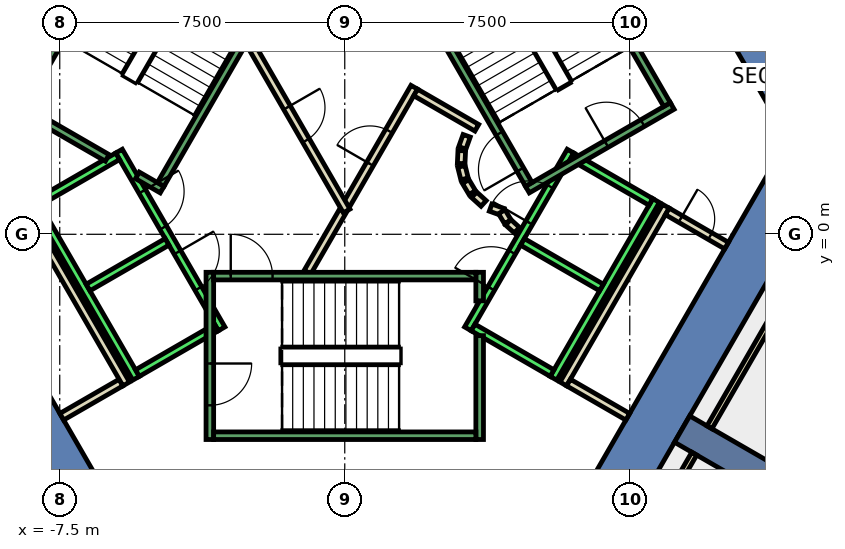
"""IFC4 building model, lengths in metres.
Left out: names, types, materials, properties, quantities, classifications, styles, units other than length and angle.
Written with IfcOpenShell. Run it as: python <this file> out.ifc"""

import sys

from ifc_helpers import new_model, si_unit, direction, frame, frame_2d, origin, place, context, subcontext, project, spatial, polyline, rectangle, outline, extrude, element, fill, save


model = new_model("IFC4")
c1 = context("Model", 3, precision=1e-05, world=origin(), true_north=direction((0.0, 1.0)))
c2 = subcontext(c1, "Body", "Model", "MODEL_VIEW")
j1 = project(units=[si_unit("LENGTHUNIT", "METRE"), si_unit("PLANEANGLEUNIT", "RADIAN")], contexts=[c1])
p1 = place(None, origin())
s1 = spatial("IfcSite", under=j1, at=p1, CompositionType="ELEMENT")
p2 = place(p1, origin())
s2 = spatial("IfcBuilding", under=s1, at=p2, CompositionType="ELEMENT")
p3 = place(p2, frame((0.0, 0.0, 227.6)))
s3 = spatial("IfcBuildingStorey", under=s2, at=p3, CompositionType="ELEMENT", Elevation=227.6)
p4 = place(p3, frame((0.0, 0.0, -0.4)))
e1 = element("IfcWall", 1, at=p4, inside=s3, PredefinedType="SHEAR", context=c2, shape_type="SweptSolid", body=[
    extrude(outline(polyline([(8.084, 11.498), (6.871, 10.798), (11.662, 2.5), (13.279, 2.5), (8.084, 11.498)])), origin(), (0.0, 0.0, 1.0), 4.2),
])
p5 = place(p3, frame((0.0, 0.0, -0.4)))
e2 = element("IfcWall", 2, at=p5, inside=s3, PredefinedType="SHEAR", context=c2, shape_type="SweptSolid", body=[
    extrude(outline(polyline([(-11.834, 5.002), (-10.622, 4.302), (-5.831, 12.6), (-6.64, 14.0), (-11.834, 5.002)])), origin(), (0.0, 0.0, 1.0), 4.2),
])
p6 = place(p3, frame((0.0, 0.0, -0.4)))
e3 = element("IfcWall", 3, at=p6, inside=s3, PredefinedType="SHEAR", context=c2, shape_type="SweptSolid", body=[
    extrude(outline(polyline([(-13.279, 2.5), (-6.64, -9.0), (-5.831, -7.6), (-11.662, 2.5), (-13.279, 2.5)])), origin(), (0.0, 0.0, 1.0), 4.2),
])
p7 = place(p3, frame((0.0, 0.0, -0.4)))
e4 = element("IfcWall", 4, at=p7, inside=s3, PredefinedType="SHEAR", context=c2, shape_type="SweptSolid", body=[
    extrude(outline(polyline([(6.64, -9.0), (13.279, 2.5), (11.662, 2.5), (5.831, -7.6), (6.64, -9.0)])), origin(), (0.0, 0.0, 1.0), 4.2),
])
p8 = place(p3, frame((8.877, -5.125, -0.4), z_axis=(0.0, 0.0, 1.0), x_axis=(0.866017533419, -0.500013631625, 0.0)))
e5 = element("IfcWall", 5, at=p8, inside=s3, PredefinedType="SHEAR", context=c2, shape_type="SweptSolid", body=[
    extrude(rectangle(XDim=9.0, YDim=0.8, at=frame_2d((4.5, 0.0))), origin(), (0.0, 0.0, 1.0), 4.2),
])
p9 = place(p3, frame((5.751, -3.938, 0.0), z_axis=(0.0, 0.0, 1.0), x_axis=(0.500034260056, 0.866005622828, 0.0)))
e6 = element("IfcWall", 6, at=p9, inside=s3, PredefinedType="PARTITIONING", context=c2, shape_type="SweptSolid", body=[
    extrude(rectangle(XDim=5.399, YDim=0.2, at=frame_2d((2.7, 0.0))), origin(), (0.0, 0.0, 1.0), 3.8),
])
p10 = place(p3, frame((8.488, 0.602, 0.0), z_axis=(0.0, 0.0, 1.0), x_axis=(0.86585331735, -0.500297944063, 0.0)))
e7 = element("IfcWall", 7, at=p10, inside=s3, PredefinedType="PARTITIONING", context=c2, shape_type="SweptSolid", body=[
    extrude(rectangle(XDim=1.799, YDim=0.2, at=frame_2d((0.9, 0.0))), origin(), (0.0, 0.0, 1.0), 3.8),
])
p11 = place(p10, frame((0.4, 0.0, 0.0)))
e8 = element("IfcOpeningElement", 8, at=p11, cuts=e7, PredefinedType="OPENING", context=c2, shape_type="SweptSolid", body=[
    extrude(rectangle(XDim=0.9, YDim=2.1, at=frame_2d((0.45, 1.05))), frame((0.0, 0.11, 0.0), z_axis=(0.0, -1.0, 0.0), x_axis=(1.0, 0.0, 0.0)), (0.0, 0.0, 1.0), 0.22),
])
for number, where, z_axis, x_axis in (
    (9, (7.447, -4.801, 0.0), (0.0, 0.0, 1.0), (-0.866, 0.499, 0.0)),
    (10, (-5.888, -3.902, 0.0), (0.0, 0.0, 1.0), (-0.866, -0.499, 0.0)),
):
    element("IfcWall", number, at=place(p3, frame(where, z_axis=z_axis, x_axis=x_axis)), inside=s3, PredefinedType="PARTITIONING", context=c2, shape_type="SweptSolid", body=[
        extrude(rectangle(XDim=1.8, YDim=0.2, at=frame_2d((0.9, 0.0))), origin(), (0.0, 0.0, 1.0), 3.8),
    ])
p12 = place(p3, frame((-9.751, 2.99, 0.0), z_axis=(0.0, 0.0, 1.0), x_axis=(0.500012163284, -0.866018381195, 0.0)))
e11 = element("IfcWall", 11, at=p12, inside=s3, PredefinedType="PARTITIONING", context=c2, shape_type="SweptSolid", body=[
    extrude(rectangle(XDim=8.0, YDim=0.2, at=frame_2d((4.0, 0.0))), origin(), (0.0, 0.0, 1.0), 3.8),
])
p13 = place(p3, frame((7.283, -9.086, 0.0), z_axis=(0.0, 0.0, 1.0), x_axis=(0.500035303972, 0.866005020067, 0.0)))
e12 = element("IfcWall", 12, at=p13, inside=s3, PredefinedType="PARTITIONING", context=c2, shape_type="SweptSolid", body=[
    extrude(rectangle(XDim=3.828, YDim=0.15, at=frame_2d((1.914, 0.0))), origin(), (0.0, 0.0, 1.0), 3.8),
])
p14 = place(p3, frame((-0.982, -1.0, 0.0), z_axis=(0.0, 0.0, 1.0), x_axis=(0.50024047865, 0.865886518847, 0.0)))
e13 = element("IfcWall", 13, at=p14, inside=s3, PredefinedType="PARTITIONING", context=c2, shape_type="SweptSolid", body=[
    extrude(rectangle(XDim=1.863, YDim=0.2, at=frame_2d((0.931, 0.0))), origin(), (0.0, 0.0, 1.0), 3.8),
])
p15 = place(p3, frame((0.05, 0.787, 0.0), z_axis=(0.0, 0.0, 1.0), x_axis=(0.499954076797, 0.866051915934, 0.0)))
e14 = element("IfcWall", 14, at=p15, inside=s3, PredefinedType="PARTITIONING", context=c2, shape_type="SweptSolid", body=[
    extrude(rectangle(XDim=3.558, YDim=0.2, at=frame_2d((1.779, 0.0))), origin(), (0.0, 0.0, 1.0), 3.8),
])
p16 = place(p15, frame((1.229, 0.0, 0.0)))
e15 = element("IfcOpeningElement", 15, at=p16, cuts=e14, PredefinedType="OPENING", context=c2, shape_type="SweptSolid", body=[
    extrude(rectangle(XDim=1.0, YDim=2.1, at=frame_2d((0.5, 1.05))), frame((0.0, 0.11, 0.0), z_axis=(0.0, -1.0, 0.0), x_axis=(1.0, 0.0, 0.0)), (0.0, 0.0, 1.0), 0.22),
])
p17 = place(p3, frame((1.866, 3.732, 0.0), z_axis=(0.0, 0.0, 1.0), x_axis=(0.866043361281, -0.499968895414, 0.0)))
e16 = element("IfcWall", 16, at=p17, inside=s3, PredefinedType="PARTITIONING", context=c2, shape_type="SweptSolid", body=[
    extrude(rectangle(XDim=1.858, YDim=0.2, at=frame_2d((0.929, 0.0))), origin(), (0.0, 0.0, 1.0), 3.8),
])
p18 = place(p3, frame((3.208, 2.592, 0.0), z_axis=(0.0, 0.0, 1.0), x_axis=(-0.337388820924, -0.941365382578, 0.0)))
e17 = element("IfcWall", 17, at=p18, inside=s3, PredefinedType="PARTITIONING", context=c2, shape_type="SweptSolid", body=[
    extrude(rectangle(XDim=0.338, YDim=0.2, at=frame_2d((0.169, 0.0))), origin(), (0.0, 0.0, 1.0), 3.8),
])
p19 = place(p3, frame((3.079, 2.199, 0.0), z_axis=(0.0, 0.0, 1.0), x_axis=(-0.047771483479, -0.998858290933, 0.0)))
e18 = element("IfcWall", 18, at=p19, inside=s3, PredefinedType="PARTITIONING", context=c2, shape_type="SweptSolid", body=[
    extrude(rectangle(XDim=0.337, YDim=0.2, at=frame_2d((0.169, 0.0))), origin(), (0.0, 0.0, 1.0), 3.8),
])
p20 = place(p3, frame((3.07, 1.786, 0.0), z_axis=(0.0, 0.0, 1.0), x_axis=(0.242705583207, -0.970099994784, 0.0)))
e19 = element("IfcWall", 19, at=p20, inside=s3, PredefinedType="PARTITIONING", context=c2, shape_type="SweptSolid", body=[
    extrude(rectangle(XDim=0.338, YDim=0.2, at=frame_2d((0.169, 0.0))), origin(), (0.0, 0.0, 1.0), 3.8),
])
for number, where, z_axis, x_axis in (
    (20, (3.182, 1.388, 0.0), (0.0, 0.0, 1.0), (0.512, -0.859, 0.0)),
    (21, (3.404, 1.039, 0.0), (0.0, 0.0, 1.0), (0.74, -0.672, 0.0)),
):
    element("IfcWall", number, at=place(p3, frame(where, z_axis=z_axis, x_axis=x_axis)), inside=s3, PredefinedType="PARTITIONING", context=c2, shape_type="SweptSolid", body=[
        extrude(rectangle(XDim=0.338, YDim=0.2, at=frame_2d((0.169, 0.0))), origin(), (0.0, 0.0, 1.0), 3.8),
    ])
p21 = place(p3, frame((3.838, 0.702, 0.0), z_axis=(0.0, 0.0, 1.0), x_axis=(0.941035081519, -0.338308993895, 0.0)))
e22 = element("IfcWall", 22, at=p21, inside=s3, PredefinedType="PARTITIONING", context=c2, shape_type="SweptSolid", body=[
    extrude(rectangle(XDim=0.337, YDim=0.2, at=frame_2d((0.168, 0.0))), origin(), (0.0, 0.0, 1.0), 3.8),
])
p22 = place(p3, frame((4.132, 0.593, 0.0), z_axis=(0.0, 0.0, 1.0), x_axis=(0.513561617048, -0.858052717201, 0.0)))
e23 = element("IfcWall", 23, at=p22, inside=s3, PredefinedType="PARTITIONING", context=c2, shape_type="SweptSolid", body=[
    extrude(rectangle(XDim=0.308, YDim=0.2, at=frame_2d((0.154, 0.0))), origin(), (0.0, 0.0, 1.0), 3.8),
])
p23 = place(p3, frame((4.301, 0.315, 0.0), z_axis=(0.0, 0.0, 1.0), x_axis=(0.741798017506, -0.670623367639, 0.0)))
e24 = element("IfcWall", 24, at=p23, inside=s3, PredefinedType="PARTITIONING", context=c2, shape_type="SweptSolid", body=[
    extrude(rectangle(XDim=0.309, YDim=0.2, at=frame_2d((0.154, 0.0))), origin(), (0.0, 0.0, 1.0), 3.8),
])
p24 = place(p3, frame((-2.54, 5.1, 0.0), z_axis=(0.0, 0.0, 1.0), x_axis=(0.499925051871, -0.866068670783, 0.0)))
e25 = element("IfcWall", 25, at=p24, inside=s3, PredefinedType="PARTITIONING", context=c2, shape_type="SweptSolid", body=[
    extrude(rectangle(XDim=5.181, YDim=0.2, at=frame_2d((2.59, 0.0))), origin(), (0.0, 0.0, 1.0), 3.8),
])
p25 = place(p24, frame((2.04, 0.0, 0.0)))
e26 = element("IfcOpeningElement", 26, at=p25, cuts=e25, PredefinedType="OPENING", context=c2, shape_type="SweptSolid", body=[
    extrude(rectangle(XDim=1.0, YDim=2.1, at=frame_2d((0.5, 1.05))), frame((0.0, 0.11, 0.0), z_axis=(0.0, -1.0, 0.0), x_axis=(1.0, 0.0, 0.0)), (0.0, 0.0, 1.0), 0.22),
])
p26 = place(p3, frame((9.597, -5.079, 0.0), z_axis=(0.0, 0.0, 1.0), x_axis=(0.499949193323, 0.866054735046, 0.0)))
e27 = element("IfcWall", 27, at=p26, inside=s3, PredefinedType="PARTITIONING", context=c2, shape_type="SweptSolid", body=[
    extrude(rectangle(XDim=11.371, YDim=0.15, at=frame_2d((5.686, 0.0))), origin(), (0.0, 0.0, 1.0), 3.8),
])
p27 = place(p3, frame((-5.94, 2.188, 0.0), z_axis=(0.0, 0.0, 1.0), x_axis=(0.500034260056, -0.866005622828, 0.0)))
e28 = element("IfcWall", 28, at=p27, inside=s3, PredefinedType="STANDARD", context=c2, shape_type="SweptSolid", body=[
    extrude(rectangle(XDim=5.399, YDim=0.2, at=frame_2d((2.7, 0.0))), origin(), (0.0, 0.0, 1.0), 3.8),
])
p28 = place(p27, frame((3.075, 0.0, 0.0)))
e29 = element("IfcOpeningElement", 29, at=p28, cuts=e28, PredefinedType="OPENING", context=c2, shape_type="SweptSolid", body=[
    extrude(rectangle(XDim=1.1, YDim=2.1, at=frame_2d((0.55, 1.05))), frame((0.0, 0.11, 0.0), z_axis=(0.0, -1.0, 0.0), x_axis=(1.0, 0.0, 0.0)), (0.0, 0.0, 1.0), 0.22),
])
p29 = place(p27, frame((1.225, 0.0, 0.0)))
e30 = element("IfcOpeningElement", 30, at=p29, cuts=e28, PredefinedType="OPENING", context=c2, shape_type="SweptSolid", body=[
    extrude(rectangle(XDim=1.1, YDim=2.1, at=frame_2d((0.55, 1.05))), frame((0.0, 0.11, 0.0), z_axis=(0.0, -1.0, 0.0), x_axis=(1.0, 0.0, 0.0)), (0.0, 0.0, 1.0), 0.22),
])
p30 = place(p3, frame((-8.192, 0.888, 0.0), z_axis=(0.0, 0.0, 1.0), x_axis=(0.500034260056, -0.866005622828, 0.0)))
e31 = element("IfcWall", 31, at=p30, inside=s3, PredefinedType="STANDARD", context=c2, shape_type="SweptSolid", body=[
    extrude(rectangle(XDim=5.399, YDim=0.2, at=frame_2d((2.7, 0.0))), origin(), (0.0, 0.0, 1.0), 3.8),
])
for number, where, z_axis, x_axis in (
    (32, (-5.977, 2.052, 0.0), (0.0, 0.0, 1.0), (-0.866, -0.5, 0.0)),
    (33, (-4.677, -0.2, 0.0), (0.0, 0.0, 1.0), (-0.866, -0.5, 0.0)),
):
    element("IfcWall", number, at=place(p3, frame(where, z_axis=z_axis, x_axis=x_axis)), inside=s3, PredefinedType="STANDARD", context=c2, shape_type="SweptSolid", body=[
        extrude(rectangle(XDim=2.399, YDim=0.2, at=frame_2d((1.2, 0.0))), origin(), (0.0, 0.0, 1.0), 3.8),
    ])
p31 = place(p3, frame((-3.377, -2.452, 0.0), z_axis=(0.0, 0.0, 1.0), x_axis=(-0.865955154139, -0.50012165622, 0.0)))
e34 = element("IfcWall", 34, at=p31, inside=s3, PredefinedType="STANDARD", context=c2, shape_type="SweptSolid", body=[
    extrude(rectangle(XDim=2.4, YDim=0.2, at=frame_2d((1.2, 0.0))), origin(), (0.0, 0.0, 1.0), 3.8),
])
p32 = place(p3, frame((3.24, -2.488, 0.0), z_axis=(0.0, 0.0, 1.0), x_axis=(0.500034260056, 0.866005622828, 0.0)))
e35 = element("IfcWall", 35, at=p32, inside=s3, PredefinedType="STANDARD", context=c2, shape_type="SweptSolid", body=[
    extrude(rectangle(XDim=5.399, YDim=0.2, at=frame_2d((2.7, 0.0))), origin(), (0.0, 0.0, 1.0), 3.8),
])
p33 = place(p32, frame((3.225, 0.0, 0.0)))
e36 = element("IfcOpeningElement", 36, at=p33, cuts=e35, PredefinedType="OPENING", context=c2, shape_type="SweptSolid", body=[
    extrude(rectangle(XDim=1.1, YDim=2.1, at=frame_2d((0.55, 1.05))), frame((0.0, 0.11, 0.0), z_axis=(0.0, -1.0, 0.0), x_axis=(1.0, 0.0, 0.0)), (0.0, 0.0, 1.0), 0.22),
])
p34 = place(p32, frame((1.225, 0.0, 0.0)))
e37 = element("IfcOpeningElement", 37, at=p34, cuts=e35, PredefinedType="OPENING", context=c2, shape_type="SweptSolid", body=[
    extrude(rectangle(XDim=1.1, YDim=2.1, at=frame_2d((0.55, 1.05))), frame((0.0, 0.11, 0.0), z_axis=(0.0, -1.0, 0.0), x_axis=(1.0, 0.0, 0.0)), (0.0, 0.0, 1.0), 0.22),
])
p35 = place(p3, frame((5.492, -3.788, 0.0), z_axis=(0.0, 0.0, 1.0), x_axis=(0.500034260056, 0.866005622828, 0.0)))
e38 = element("IfcWall", 38, at=p35, inside=s3, PredefinedType="STANDARD", context=c2, shape_type="SweptSolid", body=[
    extrude(rectangle(XDim=5.399, YDim=0.2, at=frame_2d((2.7, 0.0))), origin(), (0.0, 0.0, 1.0), 3.8),
])
p36 = place(p3, frame((3.377, -2.452, 0.0), z_axis=(0.0, 0.0, 1.0), x_axis=(0.865955154139, -0.50012165622, 0.0)))
e39 = element("IfcWall", 39, at=p36, inside=s3, PredefinedType="STANDARD", context=c2, shape_type="SweptSolid", body=[
    extrude(rectangle(XDim=2.4, YDim=0.2, at=frame_2d((1.2, 0.0))), origin(), (0.0, 0.0, 1.0), 3.8),
])
for number, where, z_axis, x_axis in (
    (40, (4.677, -0.2, 0.0), (0.0, 0.0, 1.0), (0.866, -0.5, 0.0)),
    (41, (5.977, 2.052, 0.0), (0.0, 0.0, 1.0), (0.866, -0.5, 0.0)),
):
    element("IfcWall", number, at=place(p3, frame(where, z_axis=z_axis, x_axis=x_axis)), inside=s3, PredefinedType="STANDARD", context=c2, shape_type="SweptSolid", body=[
        extrude(rectangle(XDim=2.399, YDim=0.2, at=frame_2d((1.2, 0.0))), origin(), (0.0, 0.0, 1.0), 3.8),
    ])
p37 = place(p3, frame((-3.55, -1.0, 0.0), z_axis=(0.0, 0.0, 1.0), x_axis=(0.0, -1.0, 0.0)))
e42 = element("IfcWall", 42, at=p37, inside=s3, PredefinedType="STANDARD", context=c2, shape_type="SweptSolid", body=[
    extrude(rectangle(XDim=4.4, YDim=0.2, at=frame_2d((2.2, 0.0))), origin(), (0.0, 0.0, 1.0), 3.8),
])
p38 = place(p37, frame((2.4, 0.0, 0.0)))
e43 = element("IfcOpeningElement", 43, at=p38, cuts=e42, PredefinedType="OPENING", context=c2, shape_type="SweptSolid", body=[
    extrude(rectangle(XDim=1.1, YDim=2.2, at=frame_2d((0.55, 1.1))), frame((0.0, 0.11, 0.0), z_axis=(0.0, -1.0, 0.0), x_axis=(1.0, 0.0, 0.0)), (0.0, 0.0, 1.0), 0.22),
])
p39 = place(p3, frame((3.55, -2.667, 0.0), z_axis=(0.0, 0.0, 1.0), x_axis=(0.0, -1.0, 0.0)))
e44 = element("IfcWall", 44, at=p39, inside=s3, PredefinedType="STANDARD", context=c2, shape_type="SweptSolid", body=[
    extrude(rectangle(XDim=2.733, YDim=0.2, at=frame_2d((1.366, 0.0))), origin(), (0.0, 0.0, 1.0), 3.8),
])
p40 = place(p3, frame((3.55, -1.0, 0.0), z_axis=(0.0, 0.0, 1.0), x_axis=(0.0, -1.0, 0.0)))
e45 = element("IfcWall", 45, at=p40, inside=s3, PredefinedType="STANDARD", context=c2, shape_type="SweptSolid", body=[
    extrude(rectangle(XDim=0.751, YDim=0.2, at=frame_2d((0.375, 0.0))), origin(), (0.0, 0.0, 1.0), 3.8),
])
p41 = place(p3, frame((-3.45, -1.1, 0.0), z_axis=(0.0, 0.0, 1.0), x_axis=(1.0, 0.0, 0.0)))
e46 = element("IfcWall", 46, at=p41, inside=s3, PredefinedType="STANDARD", context=c2, shape_type="SweptSolid", body=[
    extrude(rectangle(XDim=6.9, YDim=0.2, at=frame_2d((3.45, 0.0))), origin(), (0.0, 0.0, 1.0), 3.8),
])
p42 = place(p41, frame((0.45, 0.0, 0.0)))
e47 = element("IfcOpeningElement", 47, at=p42, cuts=e46, PredefinedType="OPENING", context=c2, shape_type="SweptSolid", body=[
    extrude(rectangle(XDim=1.1, YDim=2.2, at=frame_2d((0.55, 1.1))), frame((0.0, 0.11, 0.0), z_axis=(0.0, -1.0, 0.0), x_axis=(1.0, 0.0, 0.0)), (0.0, 0.0, 1.0), 0.22),
])
p43 = place(p3, frame((-3.45, -5.3, 0.0), z_axis=(0.0, 0.0, 1.0), x_axis=(1.0, 0.0, 0.0)))
e48 = element("IfcWall", 48, at=p43, inside=s3, PredefinedType="STANDARD", context=c2, shape_type="SweptSolid", body=[
    extrude(rectangle(XDim=6.9, YDim=0.2, at=frame_2d((3.45, 0.0))), origin(), (0.0, 0.0, 1.0), 3.8),
])
p44 = place(p3, frame((4.806, 1.176, 0.0), z_axis=(0.0, 0.0, 1.0), x_axis=(0.866059941101, 0.499940174841, 0.0)))
e49 = element("IfcWall", 49, at=p44, inside=s3, PredefinedType="STANDARD", context=c2, shape_type="SweptSolid", body=[
    extrude(rectangle(XDim=4.4, YDim=0.2, at=frame_2d((2.2, 0.0))), origin(), (0.0, 0.0, 1.0), 3.8),
])
p45 = place(p44, frame((2.4, 0.0, 0.0)))
e50 = element("IfcOpeningElement", 50, at=p45, cuts=e49, PredefinedType="OPENING", context=c2, shape_type="SweptSolid", body=[
    extrude(rectangle(XDim=1.1, YDim=2.2, at=frame_2d((0.55, 1.1))), frame((0.0, 0.11, 0.0), z_axis=(0.0, -1.0, 0.0), x_axis=(1.0, 0.0, 0.0)), (0.0, 0.0, 1.0), 0.22),
])
p46 = place(p3, frame((4.843, 1.312, 0.0), z_axis=(0.0, 0.0, 1.0), x_axis=(-0.499963383562, 0.866046543262, 0.0)))
e51 = element("IfcWall", 51, at=p46, inside=s3, PredefinedType="STANDARD", context=c2, shape_type="SweptSolid", body=[
    extrude(rectangle(XDim=6.9, YDim=0.2, at=frame_2d((3.45, 0.0))), origin(), (0.0, 0.0, 1.0), 3.8),
])
p47 = place(p46, frame((0.45, 0.0, 0.0)))
e52 = element("IfcOpeningElement", 52, at=p47, cuts=e51, PredefinedType="OPENING", context=c2, shape_type="SweptSolid", body=[
    extrude(rectangle(XDim=1.1, YDim=2.2, at=frame_2d((0.55, 1.1))), frame((0.0, 0.11, 0.0), z_axis=(0.0, -1.0, 0.0), x_axis=(1.0, 0.0, 0.0)), (0.0, 0.0, 1.0), 0.22),
])
p48 = place(p3, frame((8.48, 3.412, 0.0), z_axis=(0.0, 0.0, 1.0), x_axis=(-0.499978703459, 0.866037698999, 0.0)))
e53 = element("IfcWall", 53, at=p48, inside=s3, PredefinedType="STANDARD", context=c2, shape_type="SweptSolid", body=[
    extrude(rectangle(XDim=6.9, YDim=0.2, at=frame_2d((3.45, 0.0))), origin(), (0.0, 0.0, 1.0), 3.8),
])
p49 = place(p3, frame((-6.25, 2.01, 0.0), z_axis=(0.0, 0.0, 1.0), x_axis=(-0.86611865017, 0.499838457731, 0.0)))
e54 = element("IfcWall", 54, at=p49, inside=s3, PredefinedType="STANDARD", context=c2, shape_type="SweptSolid", body=[
    extrude(rectangle(XDim=2.733, YDim=0.2, at=frame_2d((1.366, 0.0))), origin(), (0.0, 0.0, 1.0), 3.8),
])
p50 = place(p3, frame((-4.806, 1.176, 0.0), z_axis=(0.0, 0.0, 1.0), x_axis=(-0.866558586415, 0.499075361355, 0.0)))
e55 = element("IfcWall", 55, at=p50, inside=s3, PredefinedType="STANDARD", context=c2, shape_type="SweptSolid", body=[
    extrude(rectangle(XDim=0.751, YDim=0.2, at=frame_2d((0.376, 0.0))), origin(), (0.0, 0.0, 1.0), 3.8),
])
p51 = place(p3, frame((-1.393, 7.288, 0.0), z_axis=(0.0, 0.0, 1.0), x_axis=(-0.499963383562, -0.866046543262, 0.0)))
e56 = element("IfcWall", 56, at=p51, inside=s3, PredefinedType="STANDARD", context=c2, shape_type="SweptSolid", body=[
    extrude(rectangle(XDim=6.9, YDim=0.2, at=frame_2d((3.45, 0.0))), origin(), (0.0, 0.0, 1.0), 3.8),
])
p52 = place(p51, frame((0.45, 0.0, 0.0)))
e57 = element("IfcOpeningElement", 57, at=p52, cuts=e56, PredefinedType="OPENING", context=c2, shape_type="SweptSolid", body=[
    extrude(rectangle(XDim=1.1, YDim=2.2, at=frame_2d((0.55, 1.1))), frame((0.0, 0.11, 0.0), z_axis=(0.0, -1.0, 0.0), x_axis=(1.0, 0.0, 0.0)), (0.0, 0.0, 1.0), 0.22),
])
p53 = place(p3, frame((-5.03, 9.388, 0.0), z_axis=(0.0, 0.0, 1.0), x_axis=(-0.499978703459, -0.866037698999, 0.0)))
e58 = element("IfcWall", 58, at=p53, inside=s3, PredefinedType="STANDARD", context=c2, shape_type="SweptSolid", body=[
    extrude(rectangle(XDim=6.9, YDim=0.2, at=frame_2d((3.45, 0.0))), origin(), (0.0, 0.0, 1.0), 3.8),
])
p54 = place(p16, origin())
e59 = element("IfcDoor", 59, at=p54, inside=s3, OperationType="SINGLE_SWING_RIGHT", PredefinedType="DOOR", context=c2, shape_type="SweptSolid", body=[
    extrude(rectangle(XDim=1.0, YDim=2.1, at=frame_2d((0.5, 1.05))), frame((0.0, 0.025, 0.0), z_axis=(0.0, -1.0, 0.0), x_axis=(1.0, 0.0, 0.0)), (0.0, 0.0, 1.0), 0.05),
])
fill(e15, e59)
p55 = place(p25, origin())
e60 = element("IfcDoor", 60, at=p55, inside=s3, OperationType="SINGLE_SWING_RIGHT", PredefinedType="DOOR", context=c2, shape_type="SweptSolid", body=[
    extrude(rectangle(XDim=1.0, YDim=2.1, at=frame_2d((0.5, 1.05))), frame((0.0, 0.025, 0.0), z_axis=(0.0, -1.0, 0.0), x_axis=(1.0, 0.0, 0.0)), (0.0, 0.0, 1.0), 0.05),
])
fill(e26, e60)
p56 = place(p11, origin())
e61 = element("IfcDoor", 61, at=p56, inside=s3, OperationType="SINGLE_SWING_RIGHT", PredefinedType="DOOR", context=c2, shape_type="SweptSolid", body=[
    extrude(rectangle(XDim=0.9, YDim=2.1, at=frame_2d((0.45, 1.05))), frame((0.0, 0.025, 0.0), z_axis=(0.0, -1.0, 0.0), x_axis=(1.0, 0.0, 0.0)), (0.0, 0.0, 1.0), 0.05),
])
fill(e8, e61)
p57 = place(p33, origin())
e62 = element("IfcDoor", 62, at=p57, inside=s3, OperationType="SLIDING_TO_LEFT", PredefinedType="DOOR", context=c2, shape_type="SweptSolid", body=[
    extrude(rectangle(XDim=1.1, YDim=2.1, at=frame_2d((0.55, 1.05))), frame((0.0, 0.025, 0.0), z_axis=(0.0, -1.0, 0.0), x_axis=(1.0, 0.0, 0.0)), (0.0, 0.0, 1.0), 0.05),
])
fill(e36, e62)
p58 = place(p28, origin())
e63 = element("IfcDoor", 63, at=p58, inside=s3, OperationType="SLIDING_TO_LEFT", PredefinedType="DOOR", context=c2, shape_type="SweptSolid", body=[
    extrude(rectangle(XDim=1.1, YDim=2.1, at=frame_2d((0.55, 1.05))), frame((0.0, 0.025, 0.0), z_axis=(0.0, -1.0, 0.0), x_axis=(1.0, 0.0, 0.0)), (0.0, 0.0, 1.0), 0.05),
])
fill(e29, e63)
p59 = place(p34, origin())
e64 = element("IfcDoor", 64, at=p59, inside=s3, OperationType="SLIDING_TO_LEFT", PredefinedType="DOOR", context=c2, shape_type="SweptSolid", body=[
    extrude(rectangle(XDim=1.1, YDim=2.1, at=frame_2d((0.55, 1.05))), frame((0.0, 0.025, 0.0), z_axis=(0.0, -1.0, 0.0), x_axis=(1.0, 0.0, 0.0)), (0.0, 0.0, 1.0), 0.05),
])
fill(e37, e64)
p60 = place(p29, origin())
e65 = element("IfcDoor", 65, at=p60, inside=s3, OperationType="SLIDING_TO_LEFT", PredefinedType="DOOR", context=c2, shape_type="SweptSolid", body=[
    extrude(rectangle(XDim=1.1, YDim=2.1, at=frame_2d((0.55, 1.05))), frame((0.0, 0.025, 0.0), z_axis=(0.0, -1.0, 0.0), x_axis=(1.0, 0.0, 0.0)), (0.0, 0.0, 1.0), 0.05),
])
fill(e30, e65)
p61 = place(p42, origin())
e66 = element("IfcDoor", 66, at=p61, inside=s3, OperationType="SINGLE_SWING_LEFT", PredefinedType="DOOR", context=c2, shape_type="SweptSolid", body=[
    extrude(rectangle(XDim=1.1, YDim=2.2, at=frame_2d((0.55, 1.1))), frame((0.0, 0.025, 0.0), z_axis=(0.0, -1.0, 0.0), x_axis=(1.0, 0.0, 0.0)), (0.0, 0.0, 1.0), 0.05),
])
fill(e47, e66)
p62 = place(p38, origin())
e67 = element("IfcDoor", 67, at=p62, inside=s3, OperationType="SINGLE_SWING_LEFT", PredefinedType="DOOR", context=c2, shape_type="SweptSolid", body=[
    extrude(rectangle(XDim=1.1, YDim=2.2, at=frame_2d((0.55, 1.1))), frame((0.0, 0.025, 0.0), z_axis=(0.0, -1.0, 0.0), x_axis=(1.0, 0.0, 0.0)), (0.0, 0.0, 1.0), 0.05),
])
fill(e43, e67)
p63 = place(p47, origin())
e68 = element("IfcDoor", 68, at=p63, inside=s3, OperationType="SINGLE_SWING_LEFT", PredefinedType="DOOR", context=c2, shape_type="SweptSolid", body=[
    extrude(rectangle(XDim=1.1, YDim=2.2, at=frame_2d((0.55, 1.1))), frame((0.0, 0.025, 0.0), z_axis=(0.0, -1.0, 0.0), x_axis=(1.0, 0.0, 0.0)), (0.0, 0.0, 1.0), 0.05),
])
fill(e52, e68)
p64 = place(p45, origin())
e69 = element("IfcDoor", 69, at=p64, inside=s3, OperationType="SINGLE_SWING_LEFT", PredefinedType="DOOR", context=c2, shape_type="SweptSolid", body=[
    extrude(rectangle(XDim=1.1, YDim=2.2, at=frame_2d((0.55, 1.1))), frame((0.0, 0.025, 0.0), z_axis=(0.0, -1.0, 0.0), x_axis=(1.0, 0.0, 0.0)), (0.0, 0.0, 1.0), 0.05),
])
fill(e50, e69)
save(model, sys.argv[1])
